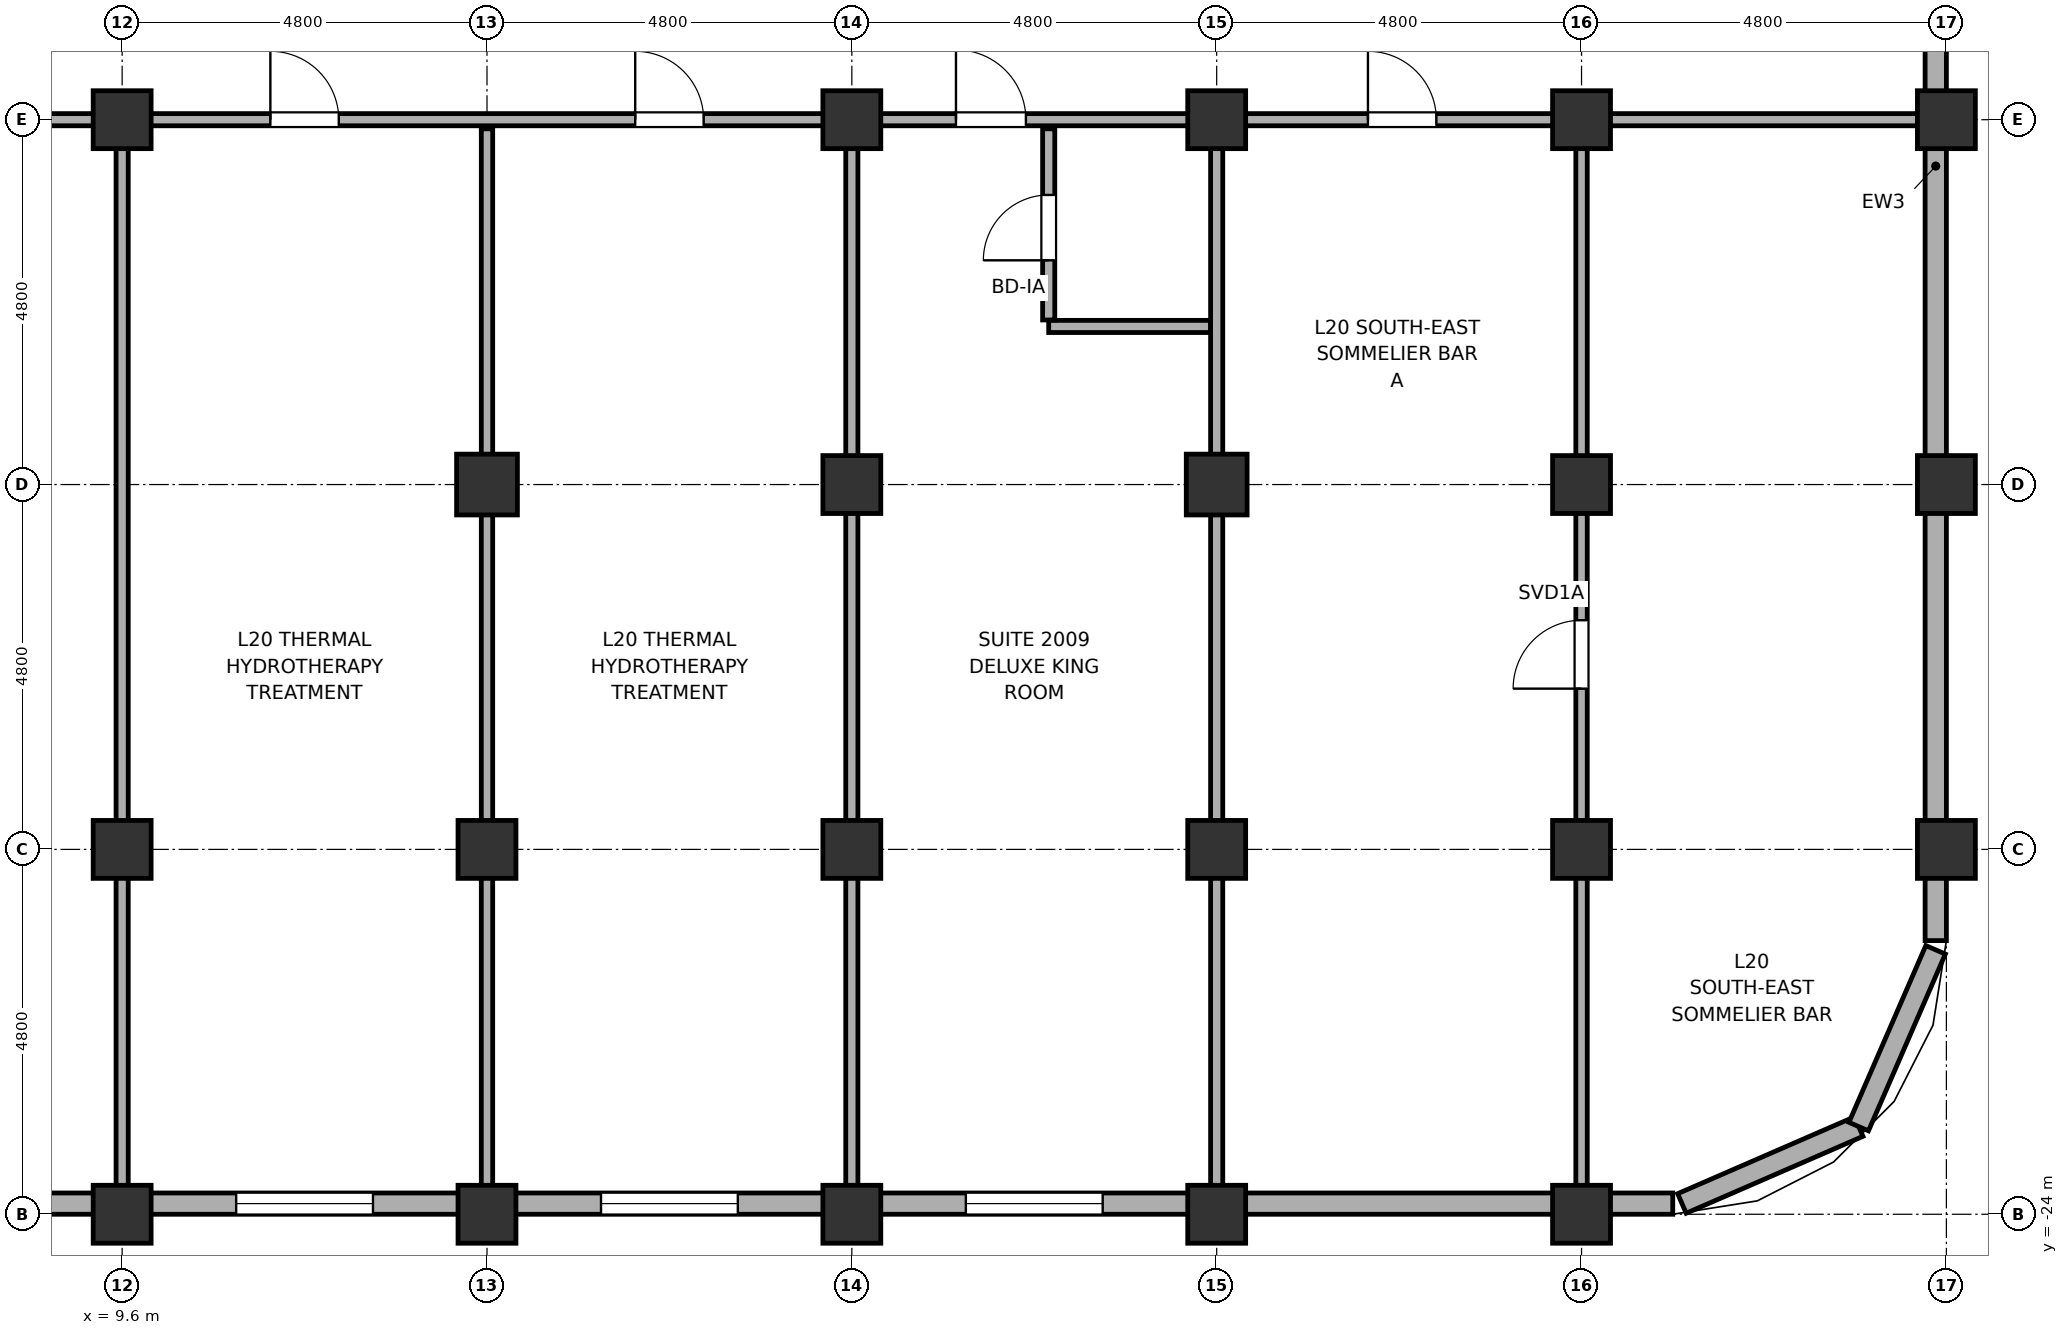
"""IFC4 building model, lengths in metres.
Left out: names, types, materials, properties, quantities, classifications, styles, units other than length and angle.
Written with IfcOpenShell. Run it as: python <this file> out.ifc"""

import sys

from ifc_helpers import new_model, si_unit, direction, frame, frame_2d, origin, origin_2d, place, context, subcontext, project, spatial, rectangle, hollow_rectangle, hollow_circle, extrude, element, fill, save


model = new_model("IFC4")
c1 = context("Model", 3, precision=1e-05, world=origin(), true_north=direction((0.0, 1.0)))
c2 = subcontext(c1, "Body", "Model", "MODEL_VIEW")
j1 = project(units=[si_unit("LENGTHUNIT", "METRE"), si_unit("PLANEANGLEUNIT", "RADIAN")], contexts=[c1])
p1 = place(None, origin())
s1 = spatial("IfcSite", under=j1, at=p1, CompositionType="ELEMENT")
p2 = place(p1, origin())
s2 = spatial("IfcBuilding", under=s1, at=p2, CompositionType="ELEMENT")
p3 = place(p2, frame((0.0, 0.0, 85.5)))
s3 = spatial("IfcBuildingStorey", under=s2, at=p3, CompositionType="ELEMENT", Elevation=85.5)
for number, where, z_axis, x_axis in (
    (1, (9.6, -24.0, 0.0), (0.0, 0.0, 1.0), (1.0, 0.0, 0.0)),
    (2, (9.6, -19.2, 0.0), (0.0, 0.0, 1.0), (1.0, 0.0, 0.0)),
    (3, (9.6, -9.6, 0.0), (0.0, 0.0, 1.0), (1.0, 0.0, 0.0)),
    (4, (14.4, -24.0, 0.0), (0.0, 0.0, 1.0), (1.0, 0.0, 0.0)),
    (5, (14.4, -19.2, 0.0), (0.0, 0.0, 1.0), (1.0, 0.0, 0.0)),
):
    element("IfcColumn", number, at=place(p3, frame(where, z_axis=z_axis, x_axis=x_axis)), inside=s3, PredefinedType="COLUMN", context=c2, shape_type="SweptSolid", body=[
        extrude(hollow_circle(Radius=0.381, WallThickness=0.032, at=origin_2d()), origin(), (0.0, 0.0, 1.0), 3.7),
    ])
p4 = place(p3, frame((14.4, -14.4, 0.0), z_axis=(0.0, 0.0, 1.0), x_axis=(1.0, 0.0, 0.0)))
e6 = element("IfcColumn", 6, at=p4, inside=s3, PredefinedType="COLUMN", context=c2, shape_type="SweptSolid", body=[
    extrude(hollow_rectangle(XDim=0.8, YDim=0.8, WallThickness=0.036, at=origin_2d()), origin(), (0.0, 0.0, 1.0), 3.7),
])
for number, where, z_axis, x_axis in (
    (7, (19.2, -24.0, 0.0), (0.0, 0.0, 1.0), (1.0, 0.0, 0.0)),
    (8, (19.2, -19.2, 0.0), (0.0, 0.0, 1.0), (1.0, 0.0, 0.0)),
    (9, (19.2, -14.4, 0.0), (0.0, 0.0, 1.0), (1.0, 0.0, 0.0)),
    (10, (19.2, -9.6, 0.0), (0.0, 0.0, 1.0), (1.0, 0.0, 0.0)),
    (11, (24.0, -24.0, 0.0), (0.0, 0.0, 1.0), (1.0, 0.0, 0.0)),
    (12, (24.0, -19.2, 0.0), (0.0, 0.0, 1.0), (1.0, 0.0, 0.0)),
):
    element("IfcColumn", number, at=place(p3, frame(where, z_axis=z_axis, x_axis=x_axis)), inside=s3, PredefinedType="COLUMN", context=c2, shape_type="SweptSolid", body=[
        extrude(hollow_circle(Radius=0.381, WallThickness=0.032, at=origin_2d()), origin(), (0.0, 0.0, 1.0), 3.7),
    ])
p5 = place(p3, frame((24.0, -14.4, 0.0), z_axis=(0.0, 0.0, 1.0), x_axis=(1.0, 0.0, 0.0)))
e13 = element("IfcColumn", 13, at=p5, inside=s3, PredefinedType="COLUMN", context=c2, shape_type="SweptSolid", body=[
    extrude(hollow_rectangle(XDim=0.8, YDim=0.8, WallThickness=0.036, at=origin_2d()), origin(), (0.0, 0.0, 1.0), 3.7),
])
for number, where, z_axis, x_axis in (
    (14, (24.0, -9.6, 0.0), (0.0, 0.0, 1.0), (1.0, 0.0, 0.0)),
    (15, (28.8, -24.0, 0.0), (0.0, 0.0, 1.0), (1.0, 0.0, 0.0)),
    (16, (28.8, -19.2, 0.0), (0.0, 0.0, 1.0), (1.0, 0.0, 0.0)),
    (17, (28.8, -14.4, 0.0), (0.0, 0.0, 1.0), (1.0, 0.0, 0.0)),
    (18, (28.8, -9.6, 0.0), (0.0, 0.0, 1.0), (1.0, 0.0, 0.0)),
    (19, (33.6, -19.2, 0.0), (0.0, 0.0, 1.0), (1.0, 0.0, 0.0)),
    (20, (33.6, -14.4, 0.0), (0.0, 0.0, 1.0), (1.0, 0.0, 0.0)),
    (21, (33.6, -9.6, 0.0), (0.0, 0.0, 1.0), (1.0, 0.0, 0.0)),
):
    element("IfcColumn", number, at=place(p3, frame(where, z_axis=z_axis, x_axis=x_axis)), inside=s3, PredefinedType="COLUMN", context=c2, shape_type="SweptSolid", body=[
        extrude(hollow_circle(Radius=0.381, WallThickness=0.032, at=origin_2d()), origin(), (0.0, 0.0, 1.0), 3.7),
    ])
p6 = place(p3, frame((30.121, -23.858, 0.0), z_axis=(0.0, 0.0, 1.0), x_axis=(0.917060872934, 0.398747232384, 0.0)))
e22 = element("IfcWall", 22, at=p6, inside=s3, PredefinedType="SOLIDWALL", context=c2, shape_type="SweptSolid", body=[
    extrude(rectangle(XDim=2.536, YDim=0.28, at=frame_2d((1.268, 0.0))), origin(), (0.0, 0.0, 1.0), 2.05),
])
p7 = place(p3, frame((32.447, -22.847, 0.0), z_axis=(0.0, 0.0, 1.0), x_axis=(0.398792985289, 0.917040977756, 0.0)))
e23 = element("IfcWall", 23, at=p7, inside=s3, PredefinedType="SOLIDWALL", context=c2, shape_type="SweptSolid", body=[
    extrude(rectangle(XDim=2.536, YDim=0.28, at=frame_2d((1.268, 0.0))), origin(), (0.0, 0.0, 1.0), 2.05),
])
p8 = place(p3, frame((4.75, -23.86, 0.0), z_axis=(0.0, 0.0, 1.0), x_axis=(1.0, 0.0, 0.0)))
e24 = element("IfcWall", 24, at=p8, inside=s3, PredefinedType="SOLIDWALL", context=c2, shape_type="SweptSolid", body=[
    extrude(rectangle(XDim=25.25, YDim=0.28, at=frame_2d((12.625, 0.0))), origin(), (0.0, 0.0, 1.0), 2.05),
])
p9 = place(p8, frame((1.55, 0.0, 0.75)))
e25 = element("IfcOpeningElement", 25, at=p9, cuts=e24, PredefinedType="OPENING", context=c2, shape_type="SweptSolid", body=[
    extrude(rectangle(XDim=1.8, YDim=1.15, at=frame_2d((0.9, 0.575))), frame((0.0, 0.155, 0.0), z_axis=(0.0, -1.0, 0.0), x_axis=(1.0, 0.0, 0.0)), (0.0, 0.0, 1.0), 0.31),
])
p10 = place(p8, frame((6.35, 0.0, 0.75)))
e26 = element("IfcOpeningElement", 26, at=p10, cuts=e24, PredefinedType="OPENING", context=c2, shape_type="SweptSolid", body=[
    extrude(rectangle(XDim=1.8, YDim=1.15, at=frame_2d((0.9, 0.575))), frame((0.0, 0.155, 0.0), z_axis=(0.0, -1.0, 0.0), x_axis=(1.0, 0.0, 0.0)), (0.0, 0.0, 1.0), 0.31),
])
p11 = place(p8, frame((11.15, 0.0, 0.75)))
e27 = element("IfcOpeningElement", 27, at=p11, cuts=e24, PredefinedType="OPENING", context=c2, shape_type="SweptSolid", body=[
    extrude(rectangle(XDim=1.8, YDim=1.15, at=frame_2d((0.9, 0.575))), frame((0.0, 0.155, 0.0), z_axis=(0.0, -1.0, 0.0), x_axis=(1.0, 0.0, 0.0)), (0.0, 0.0, 1.0), 0.31),
])
p12 = place(p8, frame((15.95, 0.0, 0.75)))
e28 = element("IfcOpeningElement", 28, at=p12, cuts=e24, PredefinedType="OPENING", context=c2, shape_type="SweptSolid", body=[
    extrude(rectangle(XDim=1.8, YDim=1.15, at=frame_2d((0.9, 0.575))), frame((0.0, 0.155, 0.0), z_axis=(0.0, -1.0, 0.0), x_axis=(1.0, 0.0, 0.0)), (0.0, 0.0, 1.0), 0.31),
])
p13 = place(p3, frame((33.46, -20.4, 0.0), z_axis=(0.0, 0.0, 1.0), x_axis=(0.0, 1.0, 0.0)))
e29 = element("IfcWall", 29, at=p13, inside=s3, PredefinedType="SOLIDWALL", context=c2, shape_type="SweptSolid", body=[
    extrude(rectangle(XDim=20.38, YDim=0.28, at=frame_2d((10.19, 0.0))), origin(), (0.0, 0.0, 1.0), 2.05),
])
p14 = place(p3, frame((21.79, -12.32, 0.0), z_axis=(0.0, 0.0, 1.0), x_axis=(1.0, 0.0, 0.0)))
e30 = element("IfcWall", 30, at=p14, inside=s3, PredefinedType="PARTITIONING", context=c2, shape_type="SweptSolid", body=[
    extrude(rectangle(XDim=2.13, YDim=0.16, at=frame_2d((1.065, 0.0))), origin(), (0.0, 0.0, 1.0), 2.75),
])
p15 = place(p3, frame((-28.51, -9.6, 0.0), z_axis=(0.0, 0.0, 1.0), x_axis=(1.0, 0.0, 0.0)))
e31 = element("IfcWall", 31, at=p15, inside=s3, PredefinedType="PARTITIONING", context=c2, shape_type="SweptSolid", body=[
    extrude(rectangle(XDim=61.82, YDim=0.16, at=frame_2d((30.91, 0.0))), origin(), (0.0, 0.0, 1.0), 2.05),
])
p16 = place(p15, frame((6.679, 0.0, 0.0)))
e32 = element("IfcOpeningElement", 32, at=p16, cuts=e31, PredefinedType="OPENING", context=c2, shape_type="SweptSolid", body=[
    extrude(rectangle(XDim=0.9, YDim=2.02, at=frame_2d((0.45, 1.01))), frame((0.0, 0.095, 0.0), z_axis=(0.0, -1.0, 0.0), x_axis=(1.0, 0.0, 0.0)), (0.0, 0.0, 1.0), 0.19),
])
p17 = place(p15, frame((54.5, 0.0, 0.0)))
e33 = element("IfcOpeningElement", 33, at=p17, cuts=e31, PredefinedType="OPENING", context=c2, shape_type="SweptSolid", body=[
    extrude(rectangle(XDim=0.9, YDim=2.02, at=frame_2d((0.45, 1.01))), frame((0.0, 0.095, 0.0), z_axis=(0.0, -1.0, 0.0), x_axis=(1.0, 0.0, 0.0)), (0.0, 0.0, 1.0), 0.19),
])
p18 = place(p15, frame((10.68, 0.0, 0.0)))
e34 = element("IfcOpeningElement", 34, at=p18, cuts=e31, PredefinedType="OPENING", context=c2, shape_type="SweptSolid", body=[
    extrude(rectangle(XDim=0.92, YDim=2.02, at=frame_2d((0.46, 1.01))), frame((0.0, 0.095, 0.0), z_axis=(0.0, -1.0, 0.0), x_axis=(1.0, 0.0, 0.0)), (0.0, 0.0, 1.0), 0.19),
])
p19 = place(p15, frame((16.62, 0.0, 0.0)))
e35 = element("IfcOpeningElement", 35, at=p19, cuts=e31, PredefinedType="OPENING", context=c2, shape_type="SweptSolid", body=[
    extrude(rectangle(XDim=0.92, YDim=2.02, at=frame_2d((0.46, 1.01))), frame((0.0, 0.095, 0.0), z_axis=(0.0, -1.0, 0.0), x_axis=(1.0, 0.0, 0.0)), (0.0, 0.0, 1.0), 0.19),
])
p20 = place(p15, frame((20.28, 0.0, 0.0)))
e36 = element("IfcOpeningElement", 36, at=p20, cuts=e31, PredefinedType="OPENING", context=c2, shape_type="SweptSolid", body=[
    extrude(rectangle(XDim=0.92, YDim=2.02, at=frame_2d((0.46, 1.01))), frame((0.0, 0.095, 0.0), z_axis=(0.0, -1.0, 0.0), x_axis=(1.0, 0.0, 0.0)), (0.0, 0.0, 1.0), 0.19),
])
p21 = place(p15, frame((26.22, 0.0, 0.0)))
e37 = element("IfcOpeningElement", 37, at=p21, cuts=e31, PredefinedType="OPENING", context=c2, shape_type="SweptSolid", body=[
    extrude(rectangle(XDim=0.92, YDim=2.02, at=frame_2d((0.46, 1.01))), frame((0.0, 0.095, 0.0), z_axis=(0.0, -1.0, 0.0), x_axis=(1.0, 0.0, 0.0)), (0.0, 0.0, 1.0), 0.19),
])
p22 = place(p15, frame((29.88, 0.0, 0.0)))
e38 = element("IfcOpeningElement", 38, at=p22, cuts=e31, PredefinedType="OPENING", context=c2, shape_type="SweptSolid", body=[
    extrude(rectangle(XDim=0.92, YDim=2.02, at=frame_2d((0.46, 1.01))), frame((0.0, 0.095, 0.0), z_axis=(0.0, -1.0, 0.0), x_axis=(1.0, 0.0, 0.0)), (0.0, 0.0, 1.0), 0.19),
])
p23 = place(p15, frame((35.82, 0.0, 0.0)))
e39 = element("IfcOpeningElement", 39, at=p23, cuts=e31, PredefinedType="OPENING", context=c2, shape_type="SweptSolid", body=[
    extrude(rectangle(XDim=0.92, YDim=2.02, at=frame_2d((0.46, 1.01))), frame((0.0, 0.095, 0.0), z_axis=(0.0, -1.0, 0.0), x_axis=(1.0, 0.0, 0.0)), (0.0, 0.0, 1.0), 0.19),
])
p24 = place(p15, frame((40.06, 0.0, 0.0)))
e40 = element("IfcOpeningElement", 40, at=p24, cuts=e31, PredefinedType="OPENING", context=c2, shape_type="SweptSolid", body=[
    extrude(rectangle(XDim=0.9, YDim=2.02, at=frame_2d((0.45, 1.01))), frame((0.0, 0.095, 0.0), z_axis=(0.0, -1.0, 0.0), x_axis=(1.0, 0.0, 0.0)), (0.0, 0.0, 1.0), 0.19),
])
p25 = place(p15, frame((44.86, 0.0, 0.0)))
e41 = element("IfcOpeningElement", 41, at=p25, cuts=e31, PredefinedType="OPENING", context=c2, shape_type="SweptSolid", body=[
    extrude(rectangle(XDim=0.9, YDim=2.02, at=frame_2d((0.45, 1.01))), frame((0.0, 0.095, 0.0), z_axis=(0.0, -1.0, 0.0), x_axis=(1.0, 0.0, 0.0)), (0.0, 0.0, 1.0), 0.19),
])
p26 = place(p15, frame((49.08, 0.0, 0.0)))
e42 = element("IfcOpeningElement", 42, at=p26, cuts=e31, PredefinedType="OPENING", context=c2, shape_type="SweptSolid", body=[
    extrude(rectangle(XDim=0.92, YDim=2.02, at=frame_2d((0.46, 1.01))), frame((0.0, 0.095, 0.0), z_axis=(0.0, -1.0, 0.0), x_axis=(1.0, 0.0, 0.0)), (0.0, 0.0, 1.0), 0.19),
])
p27 = place(p3, frame((9.6, -23.71, 0.0), z_axis=(0.0, 0.0, 1.0), x_axis=(0.0, 1.0, 0.0)))
e43 = element("IfcWall", 43, at=p27, inside=s3, PredefinedType="PARTITIONING", context=c2, shape_type="SweptSolid", body=[
    extrude(rectangle(XDim=13.99, YDim=0.16, at=frame_2d((6.995, 0.0))), origin(), (0.0, 0.0, 1.0), 2.05),
])
p28 = place(p3, frame((14.4, -23.71, 0.0), z_axis=(0.0, 0.0, 1.0), x_axis=(0.0, 1.0, 0.0)))
e44 = element("IfcWall", 44, at=p28, inside=s3, PredefinedType="PARTITIONING", context=c2, shape_type="SweptSolid", body=[
    extrude(rectangle(XDim=13.99, YDim=0.15, at=frame_2d((6.995, 0.0))), origin(), (0.0, 0.0, 1.0), 2.05),
])
p29 = place(p3, frame((19.2, -23.71, 0.0), z_axis=(0.0, 0.0, 1.0), x_axis=(0.0, 1.0, 0.0)))
e45 = element("IfcWall", 45, at=p29, inside=s3, PredefinedType="PARTITIONING", context=c2, shape_type="SweptSolid", body=[
    extrude(rectangle(XDim=13.99, YDim=0.16, at=frame_2d((6.995, 0.0))), origin(), (0.0, 0.0, 1.0), 2.05),
])
p30 = place(p3, frame((21.79, -12.235, 0.0), z_axis=(0.0, 0.0, 1.0), x_axis=(0.0, 1.0, 0.0)))
e46 = element("IfcWall", 46, at=p30, inside=s3, PredefinedType="PARTITIONING", context=c2, shape_type="SweptSolid", body=[
    extrude(rectangle(XDim=2.515, YDim=0.16, at=frame_2d((1.258, 0.0))), origin(), (0.0, 0.0, 1.0), 2.05),
])
p31 = place(p30, frame((0.785, 0.0, 0.0)))
e47 = element("IfcOpeningElement", 47, at=p31, cuts=e46, PredefinedType="OPENING", context=c2, shape_type="SweptSolid", body=[
    extrude(rectangle(XDim=0.86, YDim=2.02, at=frame_2d((0.43, 1.01))), frame((0.0, 0.095, 0.0), z_axis=(0.0, -1.0, 0.0), x_axis=(1.0, 0.0, 0.0)), (0.0, 0.0, 1.0), 0.19),
])
p32 = place(p3, frame((24.0, -23.71, 0.0), z_axis=(0.0, 0.0, 1.0), x_axis=(0.0, 1.0, 0.0)))
e48 = element("IfcWall", 48, at=p32, inside=s3, PredefinedType="PARTITIONING", context=c2, shape_type="SweptSolid", body=[
    extrude(rectangle(XDim=13.99, YDim=0.16, at=frame_2d((6.995, 0.0))), origin(), (0.0, 0.0, 1.0), 2.05),
])
p33 = place(p3, frame((28.8, -23.71, 0.0), z_axis=(0.0, 0.0, 1.0), x_axis=(0.0, 1.0, 0.0)))
e49 = element("IfcWall", 49, at=p33, inside=s3, PredefinedType="PARTITIONING", context=c2, shape_type="SweptSolid", body=[
    extrude(rectangle(XDim=13.99, YDim=0.15, at=frame_2d((6.995, 0.0))), origin(), (0.0, 0.0, 1.0), 2.05),
])
p34 = place(p33, frame((6.625, 0.0, 0.0)))
e50 = element("IfcOpeningElement", 50, at=p34, cuts=e49, PredefinedType="OPENING", context=c2, shape_type="SweptSolid", body=[
    extrude(rectangle(XDim=0.9, YDim=2.02, at=frame_2d((0.45, 1.01))), frame((0.0, 0.09, 0.0), z_axis=(0.0, -1.0, 0.0), x_axis=(1.0, 0.0, 0.0)), (0.0, 0.0, 1.0), 0.18),
])
p35 = place(p10, origin())
e51 = element("IfcWindow", 51, at=p35, inside=s3, PartitioningType="SINGLE_PANEL", PredefinedType="WINDOW", context=c2, shape_type="SweptSolid", body=[
    extrude(rectangle(XDim=1.8, YDim=1.15, at=frame_2d((0.9, 0.575))), frame((0.0, 0.03, 0.0), z_axis=(0.0, -1.0, 0.0), x_axis=(1.0, 0.0, 0.0)), (0.0, 0.0, 1.0), 0.06),
])
fill(e26, e51)
p36 = place(p11, origin())
e52 = element("IfcWindow", 52, at=p36, inside=s3, PartitioningType="SINGLE_PANEL", PredefinedType="WINDOW", context=c2, shape_type="SweptSolid", body=[
    extrude(rectangle(XDim=1.8, YDim=1.15, at=frame_2d((0.9, 0.575))), frame((0.0, 0.03, 0.0), z_axis=(0.0, -1.0, 0.0), x_axis=(1.0, 0.0, 0.0)), (0.0, 0.0, 1.0), 0.06),
])
fill(e27, e52)
p37 = place(p12, origin())
e53 = element("IfcWindow", 53, at=p37, inside=s3, PartitioningType="SINGLE_PANEL", PredefinedType="WINDOW", context=c2, shape_type="SweptSolid", body=[
    extrude(rectangle(XDim=1.8, YDim=1.15, at=frame_2d((0.9, 0.575))), frame((0.0, 0.03, 0.0), z_axis=(0.0, -1.0, 0.0), x_axis=(1.0, 0.0, 0.0)), (0.0, 0.0, 1.0), 0.06),
])
fill(e28, e53)
p38 = place(p17, origin())
e54 = element("IfcDoor", 54, at=p38, inside=s3, OperationType="SINGLE_SWING_RIGHT", PredefinedType="DOOR", context=c2, shape_type="SweptSolid", body=[
    extrude(rectangle(XDim=0.9, YDim=2.02, at=frame_2d((0.45, 1.01))), frame((0.0, 0.025, 0.0), z_axis=(0.0, -1.0, 0.0), x_axis=(1.0, 0.0, 0.0)), (0.0, 0.0, 1.0), 0.05),
])
fill(e33, e54)
p39 = place(p34, origin())
e55 = element("IfcDoor", 55, at=p39, inside=s3, OperationType="SINGLE_SWING_RIGHT", PredefinedType="DOOR", context=c2, shape_type="SweptSolid", body=[
    extrude(rectangle(XDim=0.9, YDim=2.02, at=frame_2d((0.45, 1.01))), frame((0.0, 0.025, 0.0), z_axis=(0.0, -1.0, 0.0), x_axis=(1.0, 0.0, 0.0)), (0.0, 0.0, 1.0), 0.05),
])
fill(e50, e55)
p40 = place(p24, origin())
e56 = element("IfcDoor", 56, at=p40, inside=s3, OperationType="SINGLE_SWING_RIGHT", PredefinedType="DOOR", context=c2, shape_type="SweptSolid", body=[
    extrude(rectangle(XDim=0.9, YDim=2.02, at=frame_2d((0.45, 1.01))), frame((0.0, 0.025, 0.0), z_axis=(0.0, -1.0, 0.0), x_axis=(1.0, 0.0, 0.0)), (0.0, 0.0, 1.0), 0.05),
])
fill(e40, e56)
p41 = place(p25, origin())
e57 = element("IfcDoor", 57, at=p41, inside=s3, OperationType="SINGLE_SWING_LEFT", PredefinedType="DOOR", context=c2, shape_type="SweptSolid", body=[
    extrude(rectangle(XDim=0.9, YDim=2.02, at=frame_2d((0.45, 1.01))), frame((0.0, 0.025, 0.0), z_axis=(0.0, -1.0, 0.0), x_axis=(1.0, 0.0, 0.0)), (0.0, 0.0, 1.0), 0.05),
])
fill(e41, e57)
p42 = place(p26, origin())
e58 = element("IfcDoor", 58, at=p42, inside=s3, OperationType="SINGLE_SWING_RIGHT", PredefinedType="DOOR", context=c2, shape_type="SweptSolid", body=[
    extrude(rectangle(XDim=0.92, YDim=2.02, at=frame_2d((0.46, 1.01))), frame((0.0, 0.025, 0.0), z_axis=(0.0, -1.0, 0.0), x_axis=(1.0, 0.0, 0.0)), (0.0, 0.0, 1.0), 0.05),
])
fill(e42, e58)
p43 = place(p31, origin())
e59 = element("IfcDoor", 59, at=p43, inside=s3, OperationType="SINGLE_SWING_LEFT", PredefinedType="DOOR", context=c2, shape_type="SweptSolid", body=[
    extrude(rectangle(XDim=0.86, YDim=2.02, at=frame_2d((0.43, 1.01))), frame((0.0, 0.025, 0.0), z_axis=(0.0, -1.0, 0.0), x_axis=(1.0, 0.0, 0.0)), (0.0, 0.0, 1.0), 0.05),
])
fill(e47, e59)
save(model, sys.argv[1])
